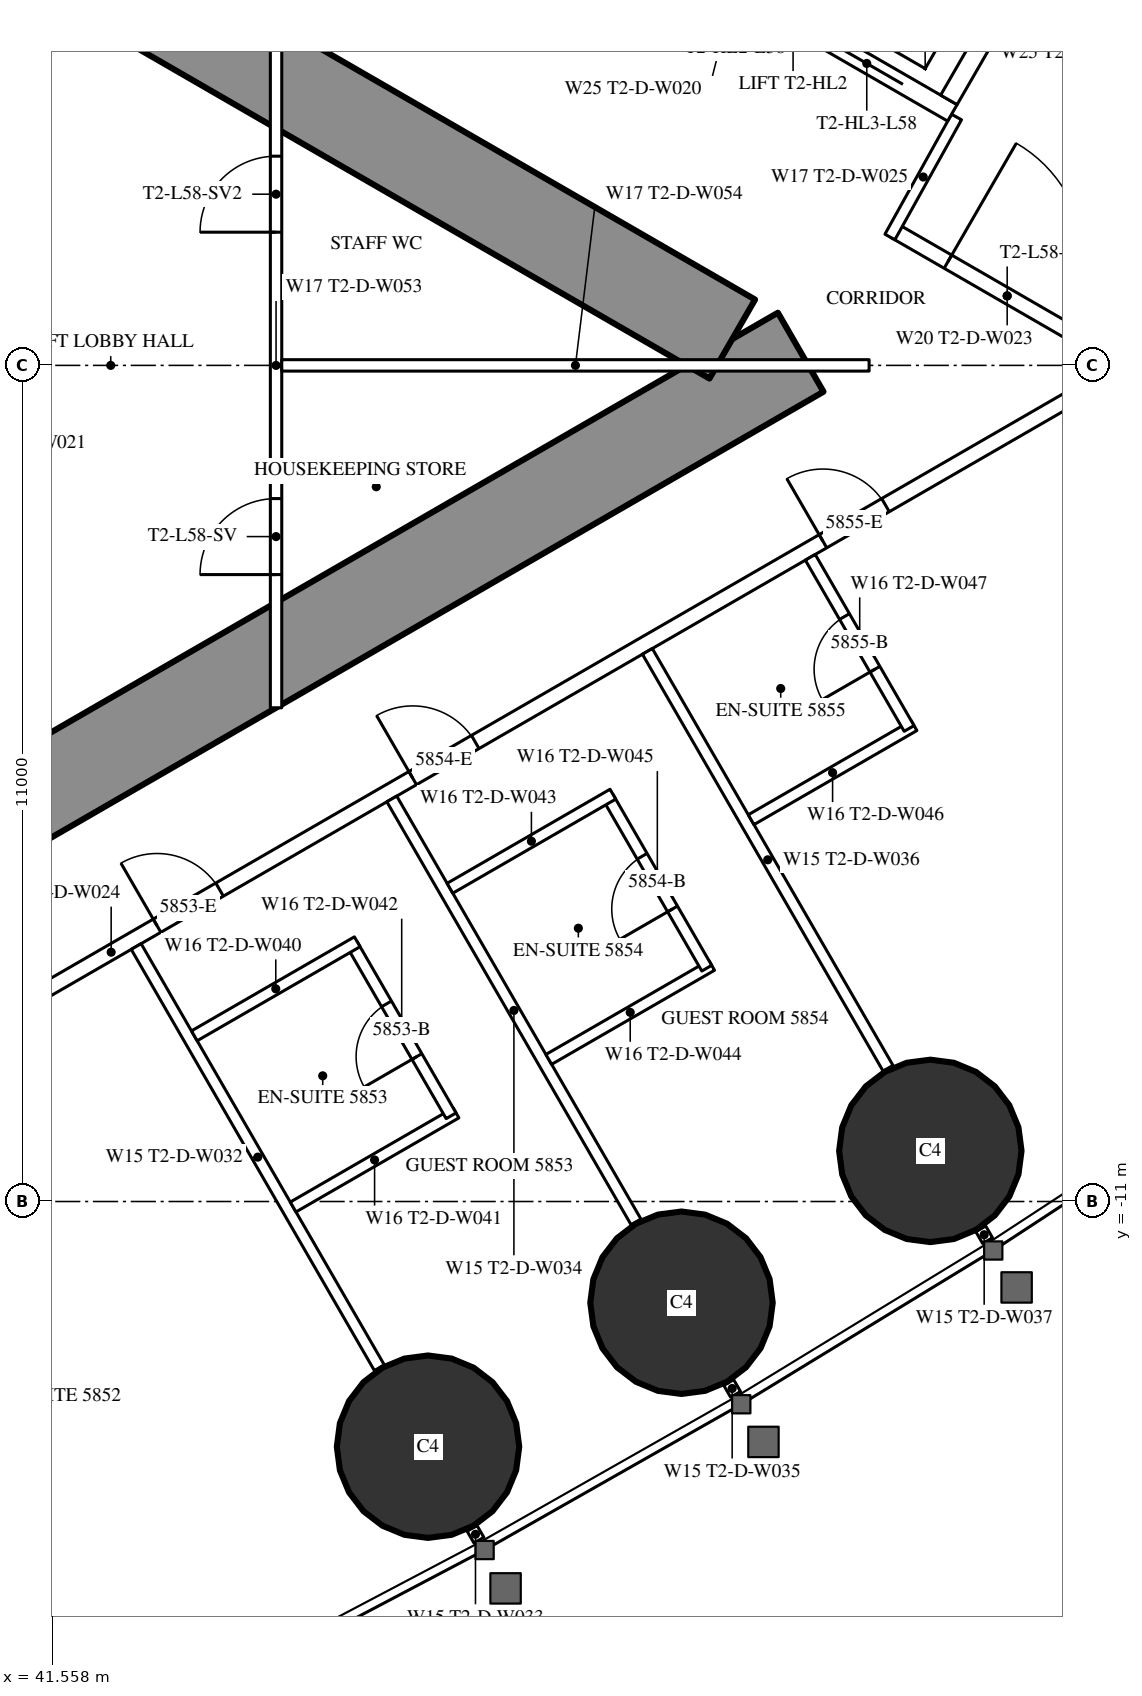
"""IFC4 building model, lengths in metres.
Left out: names, types, materials, properties, quantities, classifications, styles, units other than length and angle.
Written with IfcOpenShell. Run it as: python <this file> out.ifc"""

import sys

from ifc_helpers import new_model, si_unit, direction, frame, frame_2d, origin, origin_2d, place, context, subcontext, project, spatial, rectangle, circle, extrude, element, fill, save


model = new_model("IFC4")
c1 = context("Model", 3, precision=1e-05, world=origin(), true_north=direction((0.0, 1.0)))
c2 = subcontext(c1, "Body", "Model", "MODEL_VIEW")
j1 = project(units=[si_unit("LENGTHUNIT", "METRE"), si_unit("PLANEANGLEUNIT", "RADIAN")], contexts=[c1])
p1 = place(None, origin())
s1 = spatial("IfcSite", under=j1, at=p1, CompositionType="ELEMENT")
p2 = place(p1, origin())
s2 = spatial("IfcBuilding", under=s1, at=p2, CompositionType="ELEMENT")
p3 = place(p2, frame((0.0, 0.0, 218.9)))
s3 = spatial("IfcBuildingStorey", under=s2, at=p3, CompositionType="ELEMENT", Elevation=218.9)
for number, where, z_axis, x_axis in (
    (1, (46.499, -14.226, 0.0), (0.0, 0.0, 1.0), (1.0, 0.0, 0.0)),
    (2, (49.834, -12.332, 0.0), (0.0, 0.0, 1.0), (1.0, 0.0, 0.0)),
    (3, (53.108, -10.334, 0.0), (0.0, 0.0, 1.0), (1.0, 0.0, 0.0)),
):
    element("IfcColumn", number, at=place(p3, frame(where, z_axis=z_axis, x_axis=x_axis)), inside=s3, PredefinedType="COLUMN", context=c2, shape_type="SweptSolid", body=[
        extrude(circle(Radius=1.2, at=origin_2d()), origin(), (0.0, 0.0, 1.0), 3.6),
    ])
p4 = place(p3, frame((27.2, -13.8, 0.0), z_axis=(0.0, 0.0, 1.0), x_axis=(0.866027159892, 0.499996958321, 0.0)))
e4 = element("IfcWall", 4, at=p4, inside=s3, PredefinedType="SHEAR", context=c2, shape_type="SweptSolid", body=[
    extrude(rectangle(XDim=27.947, YDim=1.2, at=frame_2d((13.973, 0.0))), origin(), (0.0, 0.0, 1.0), 3.6),
])
p5 = place(p4, frame((4.6, 0.0, 0.0)))
e5 = element("IfcOpeningElement", 5, at=p5, cuts=e4, PredefinedType="OPENING", context=c2, shape_type="SweptSolid", body=[
    extrude(rectangle(XDim=1.0, YDim=2.2, at=frame_2d((0.5, 1.1))), frame((0.0, 0.61, 0.0), z_axis=(0.0, -1.0, 0.0), x_axis=(1.0, 0.0, 0.0)), (0.0, 0.0, 1.0), 1.22),
])
p6 = place(p4, frame((13.395, 0.0, 0.0)))
e6 = element("IfcOpeningElement", 6, at=p6, cuts=e4, PredefinedType="OPENING", context=c2, shape_type="SweptSolid", body=[
    extrude(rectangle(XDim=1.8, YDim=2.2, at=frame_2d((0.9, 1.1))), frame((0.0, 0.61, 0.0), z_axis=(0.0, -1.0, 0.0), x_axis=(1.0, 0.0, 0.0)), (0.0, 0.0, 1.0), 1.22),
])
p7 = place(p3, frame((27.2, 13.8, 0.0), z_axis=(0.0, 0.0, 1.0), x_axis=(0.866024515034, -0.500001539357, 0.0)))
e7 = element("IfcWall", 7, at=p7, inside=s3, PredefinedType="SHEAR", context=c2, shape_type="SweptSolid", body=[
    extrude(rectangle(XDim=26.907, YDim=1.2, at=frame_2d((13.454, 0.0))), origin(), (0.0, 0.0, 1.0), 3.6),
])
p8 = place(p7, frame((4.6, 0.0, 0.0)))
e8 = element("IfcOpeningElement", 8, at=p8, cuts=e7, PredefinedType="OPENING", context=c2, shape_type="SweptSolid", body=[
    extrude(rectangle(XDim=1.0, YDim=2.2, at=frame_2d((0.5, 1.1))), frame((0.0, 0.61, 0.0), z_axis=(0.0, -1.0, 0.0), x_axis=(1.0, 0.0, 0.0)), (0.0, 0.0, 1.0), 1.22),
])
p9 = place(p7, frame((13.395, 0.0, 0.0)))
e9 = element("IfcOpeningElement", 9, at=p9, cuts=e7, PredefinedType="OPENING", context=c2, shape_type="SweptSolid", body=[
    extrude(rectangle(XDim=1.8, YDim=2.2, at=frame_2d((0.9, 1.1))), frame((0.0, 0.61, 0.0), z_axis=(0.0, -1.0, 0.0), x_axis=(1.0, 0.0, 0.0)), (0.0, 0.0, 1.0), 1.22),
])
p10 = place(p3, frame((28.959, -15.44, 0.0), z_axis=(0.0, 0.0, 1.0), x_axis=(0.866025227435, 0.500000305447, 0.0)))
e10 = element("IfcWall", 10, at=p10, inside=s3, PredefinedType="PARTITIONING", context=c2, shape_type="SweptSolid", body=[
    extrude(rectangle(XDim=30.88, YDim=0.2, at=frame_2d((15.44, 0.0))), origin(), (0.0, 0.0, 1.0), 3.35),
])
p11 = place(p10, frame((1.494, 0.0, 0.0)))
e11 = element("IfcOpeningElement", 11, at=p11, cuts=e10, PredefinedType="OPENING", context=c2, shape_type="SweptSolid", body=[
    extrude(rectangle(XDim=1.8, YDim=2.03, at=frame_2d((0.9, 1.015))), frame((0.0, 0.11, 0.0), z_axis=(0.0, -1.0, 0.0), x_axis=(1.0, 0.0, 0.0)), (0.0, 0.0, 1.0), 0.22),
])
p12 = place(p10, frame((7.687, 0.0, 0.0)))
e12 = element("IfcOpeningElement", 12, at=p12, cuts=e10, PredefinedType="OPENING", context=c2, shape_type="SweptSolid", body=[
    extrude(rectangle(XDim=1.0, YDim=2.2, at=frame_2d((0.5, 1.1))), frame((0.0, 0.11, 0.0), z_axis=(0.0, -1.0, 0.0), x_axis=(1.0, 0.0, 0.0)), (0.0, 0.0, 1.0), 0.22),
])
p13 = place(p10, frame((16.137, 0.0, 0.0)))
e13 = element("IfcOpeningElement", 13, at=p13, cuts=e10, PredefinedType="OPENING", context=c2, shape_type="SweptSolid", body=[
    extrude(rectangle(XDim=0.95, YDim=2.2, at=frame_2d((0.475, 1.1))), frame((0.0, 0.11, 0.0), z_axis=(0.0, -1.0, 0.0), x_axis=(1.0, 0.0, 0.0)), (0.0, 0.0, 1.0), 0.22),
])
p14 = place(p10, frame((20.021, 0.0, 0.0)))
e14 = element("IfcOpeningElement", 14, at=p14, cuts=e10, PredefinedType="OPENING", context=c2, shape_type="SweptSolid", body=[
    extrude(rectangle(XDim=0.95, YDim=2.2, at=frame_2d((0.475, 1.1))), frame((0.0, 0.11, 0.0), z_axis=(0.0, -1.0, 0.0), x_axis=(1.0, 0.0, 0.0)), (0.0, 0.0, 1.0), 0.22),
])
p15 = place(p10, frame((26.253, 0.0, 0.0)))
e15 = element("IfcOpeningElement", 15, at=p15, cuts=e10, PredefinedType="OPENING", context=c2, shape_type="SweptSolid", body=[
    extrude(rectangle(XDim=0.95, YDim=2.2, at=frame_2d((0.475, 1.1))), frame((0.0, 0.11, 0.0), z_axis=(0.0, -1.0, 0.0), x_axis=(1.0, 0.0, 0.0)), (0.0, 0.0, 1.0), 0.22),
])
p16 = place(p3, frame((42.66, -7.646, 0.0), z_axis=(0.0, 0.0, 1.0), x_axis=(0.499996592859, -0.866027370889, 0.0)))
e16 = element("IfcWall", 16, at=p16, inside=s3, PredefinedType="PARTITIONING", context=c2, shape_type="SweptSolid", body=[
    extrude(rectangle(XDim=6.398, YDim=0.15, at=frame_2d((3.199, 0.0))), origin(), (0.0, 0.0, 1.0), 2.45),
])
p17 = place(p3, frame((47.079, -15.3, 0.0), z_axis=(0.0, 0.0, 1.0), x_axis=(0.499212083968, -0.866479829667, 0.0)))
e17 = element("IfcWall", 17, at=p17, inside=s3, PredefinedType="PARTITIONING", context=c2, shape_type="SweptSolid", body=[
    extrude(rectangle(XDim=0.179, YDim=0.15, at=frame_2d((0.09, 0.0))), origin(), (0.0, 0.0, 1.0), 2.45),
])
p18 = place(p3, frame((46.023, -5.704, 0.0), z_axis=(0.0, 0.0, 1.0), x_axis=(0.499984478165, -0.866034365135, 0.0)))
e18 = element("IfcWall", 18, at=p18, inside=s3, PredefinedType="PARTITIONING", context=c2, shape_type="SweptSolid", body=[
    extrude(rectangle(XDim=6.426, YDim=0.15, at=frame_2d((3.213, 0.0))), origin(), (0.0, 0.0, 1.0), 2.45),
])
p19 = place(p3, frame((50.456, -13.382, 0.0), z_axis=(0.0, 0.0, 1.0), x_axis=(0.500661834965, -0.865642955848, 0.0)))
e19 = element("IfcWall", 19, at=p19, inside=s3, PredefinedType="PARTITIONING", context=c2, shape_type="SweptSolid", body=[
    extrude(rectangle(XDim=0.18, YDim=0.15, at=frame_2d((0.09, 0.0))), origin(), (0.0, 0.0, 1.0), 2.45),
])
p20 = place(p3, frame((49.385, -3.763, 0.0), z_axis=(0.0, 0.0, 1.0), x_axis=(0.499999447814, -0.866025722589, 0.0)))
e20 = element("IfcWall", 20, at=p20, inside=s3, PredefinedType="PARTITIONING", context=c2, shape_type="SweptSolid", body=[
    extrude(rectangle(XDim=6.333, YDim=0.15, at=frame_2d((3.166, 0.0))), origin(), (0.0, 0.0, 1.0), 2.45),
])
p21 = place(p3, frame((53.771, -11.36, 0.0), z_axis=(0.0, 0.0, 1.0), x_axis=(0.499524978789, -0.866299483762, 0.0)))
e21 = element("IfcWall", 21, at=p21, inside=s3, PredefinedType="PARTITIONING", context=c2, shape_type="SweptSolid", body=[
    extrude(rectangle(XDim=0.178, YDim=0.15, at=frame_2d((0.089, 0.0))), origin(), (0.0, 0.0, 1.0), 2.45),
])
p22 = place(p3, frame((52.639, 1.769, 0.0), z_axis=(0.0, 0.0, 1.0), x_axis=(0.866027340901, -0.4999966448, 0.0)))
e22 = element("IfcWall", 22, at=p22, inside=s3, PredefinedType="PARTITIONING", context=c2, shape_type="SweptSolid", body=[
    extrude(rectangle(XDim=3.417, YDim=0.2, at=frame_2d((1.708, 0.0))), origin(), (0.0, 0.0, 1.0), 3.35),
])
p23 = place(p22, frame((0.809, 0.0, 0.0)))
e23 = element("IfcOpeningElement", 23, at=p23, cuts=e22, PredefinedType="OPENING", context=c2, shape_type="SweptSolid", body=[
    extrude(rectangle(XDim=1.8, YDim=2.2, at=frame_2d((0.9, 1.1))), frame((0.0, 0.11, 0.0), z_axis=(0.0, -1.0, 0.0), x_axis=(1.0, 0.0, 0.0)), (0.0, 0.0, 1.0), 0.22),
])
p24 = place(p3, frame((52.576, 1.689, 0.0), z_axis=(0.0, 0.0, 1.0), x_axis=(0.485424724123, 0.874278466629, 0.0)))
e24 = element("IfcWall", 24, at=p24, inside=s3, PredefinedType="PARTITIONING", context=c2, shape_type="SweptSolid", body=[
    extrude(rectangle(XDim=1.805, YDim=0.15, at=frame_2d((0.903, 0.0))), origin(), (0.0, 0.0, 1.0), 3.35),
])
p25 = place(p3, frame((44.725, -11.072, 0.0), z_axis=(0.0, 0.0, 1.0), x_axis=(0.866006523861, 0.500032699561, 0.0)))
e25 = element("IfcWall", 25, at=p25, inside=s3, PredefinedType="PARTITIONING", context=c2, shape_type="SweptSolid", body=[
    extrude(rectangle(XDim=2.475, YDim=0.15, at=frame_2d((1.237, 0.0))), origin(), (0.0, 0.0, 1.0), 3.35),
])
p26 = place(p3, frame((45.503, -7.621, 0.0), z_axis=(0.0, 0.0, 1.0), x_axis=(0.500006934395, -0.866021400173, 0.0)))
e26 = element("IfcWall", 26, at=p26, inside=s3, PredefinedType="PARTITIONING", context=c2, shape_type="SweptSolid", body=[
    extrude(rectangle(XDim=2.6, YDim=0.15, at=frame_2d((1.3, 0.0))), origin(), (0.0, 0.0, 1.0), 3.35),
])
p27 = place(p26, frame((0.9, 0.0, 0.0)))
e27 = element("IfcOpeningElement", 27, at=p27, cuts=e26, PredefinedType="OPENING", context=c2, shape_type="SweptSolid", body=[
    extrude(rectangle(XDim=0.8, YDim=2.2, at=frame_2d((0.4, 1.1))), frame((0.0, 0.085, 0.0), z_axis=(0.0, -1.0, 0.0), x_axis=(1.0, 0.0, 0.0)), (0.0, 0.0, 1.0), 0.17),
])
for number, where, z_axis, x_axis in (
    (28, (43.425, -8.821, 0.0), (0.0, 0.0, 1.0), (0.866, 0.5, 0.0)),
    (29, (48.088, -9.13, 0.0), (0.0, 0.0, 1.0), (0.866, 0.5, 0.0)),
):
    element("IfcWall", number, at=place(p3, frame(where, z_axis=z_axis, x_axis=x_axis)), inside=s3, PredefinedType="PARTITIONING", context=c2, shape_type="SweptSolid", body=[
        extrude(rectangle(XDim=2.475, YDim=0.15, at=frame_2d((1.237, 0.0))), origin(), (0.0, 0.0, 1.0), 3.35),
    ])
p28 = place(p3, frame((48.866, -5.679, 0.0), z_axis=(0.0, 0.0, 1.0), x_axis=(0.500006934395, -0.866021400173, 0.0)))
e30 = element("IfcWall", 30, at=p28, inside=s3, PredefinedType="PARTITIONING", context=c2, shape_type="SweptSolid", body=[
    extrude(rectangle(XDim=2.6, YDim=0.15, at=frame_2d((1.3, 0.0))), origin(), (0.0, 0.0, 1.0), 3.35),
])
p29 = place(p28, frame((0.9, 0.0, 0.0)))
e31 = element("IfcOpeningElement", 31, at=p29, cuts=e30, PredefinedType="OPENING", context=c2, shape_type="SweptSolid", body=[
    extrude(rectangle(XDim=0.8, YDim=2.2, at=frame_2d((0.4, 1.1))), frame((0.0, 0.085, 0.0), z_axis=(0.0, -1.0, 0.0), x_axis=(1.0, 0.0, 0.0)), (0.0, 0.0, 1.0), 0.17),
])
p30 = place(p3, frame((46.788, -6.879, 0.0), z_axis=(0.0, 0.0, 1.0), x_axis=(0.866006523861, 0.500032699561, 0.0)))
e32 = element("IfcWall", 32, at=p30, inside=s3, PredefinedType="PARTITIONING", context=c2, shape_type="SweptSolid", body=[
    extrude(rectangle(XDim=2.475, YDim=0.15, at=frame_2d((1.237, 0.0))), origin(), (0.0, 0.0, 1.0), 3.35),
])
p31 = place(p3, frame((50.75, -5.977, 0.0), z_axis=(0.0, 0.0, 1.0), x_axis=(0.866031185235, 0.4999899861, 0.0)))
e33 = element("IfcWall", 33, at=p31, inside=s3, PredefinedType="PARTITIONING", context=c2, shape_type="SweptSolid", body=[
    extrude(rectangle(XDim=2.475, YDim=0.15, at=frame_2d((1.238, 0.0))), origin(), (0.0, 0.0, 1.0), 3.35),
])
p32 = place(p3, frame((51.529, -2.525, 0.0), z_axis=(0.0, 0.0, 1.0), x_axis=(0.500006934395, -0.866021400173, 0.0)))
e34 = element("IfcWall", 34, at=p32, inside=s3, PredefinedType="PARTITIONING", context=c2, shape_type="SweptSolid", body=[
    extrude(rectangle(XDim=2.6, YDim=0.15, at=frame_2d((1.3, 0.0))), origin(), (0.0, 0.0, 1.0), 3.35),
])
p33 = place(p32, frame((0.9, 0.0, 0.0)))
e35 = element("IfcOpeningElement", 35, at=p33, cuts=e34, PredefinedType="OPENING", context=c2, shape_type="SweptSolid", body=[
    extrude(rectangle(XDim=0.8, YDim=2.2, at=frame_2d((0.4, 1.1))), frame((0.0, 0.085, 0.0), z_axis=(0.0, -1.0, 0.0), x_axis=(1.0, 0.0, 0.0)), (0.0, 0.0, 1.0), 0.17),
])
p34 = place(p3, frame((44.5, -4.505, 0.0), z_axis=(0.0, 0.0, 1.0), x_axis=(0.0, 1.0, 0.0)))
e36 = element("IfcWall", 36, at=p34, inside=s3, PredefinedType="PARTITIONING", context=c2, shape_type="SweptSolid", body=[
    extrude(rectangle(XDim=9.009, YDim=0.15, at=frame_2d((4.505, 0.0))), origin(), (0.0, 0.0, 1.0), 3.35),
])
p35 = place(p34, frame((1.752, 0.0, 0.0)))
e37 = element("IfcOpeningElement", 37, at=p35, cuts=e36, PredefinedType="OPENING", context=c2, shape_type="SweptSolid", body=[
    extrude(rectangle(XDim=1.0, YDim=2.2, at=frame_2d((0.5, 1.1))), frame((0.0, 0.085, 0.0), z_axis=(0.0, -1.0, 0.0), x_axis=(1.0, 0.0, 0.0)), (0.0, 0.0, 1.0), 0.17),
])
p36 = place(p34, frame((6.257, 0.0, 0.0)))
e38 = element("IfcOpeningElement", 38, at=p36, cuts=e36, PredefinedType="OPENING", context=c2, shape_type="SweptSolid", body=[
    extrude(rectangle(XDim=1.0, YDim=2.2, at=frame_2d((0.5, 1.1))), frame((0.0, 0.085, 0.0), z_axis=(0.0, -1.0, 0.0), x_axis=(1.0, 0.0, 0.0)), (0.0, 0.0, 1.0), 0.17),
])
p37 = place(p3, frame((44.575, 0.0, 0.0), z_axis=(0.0, 0.0, 1.0), x_axis=(1.0, 0.0, 0.0)))
e39 = element("IfcWall", 39, at=p37, inside=s3, PredefinedType="PARTITIONING", context=c2, shape_type="SweptSolid", body=[
    extrude(rectangle(XDim=7.727, YDim=0.15, at=frame_2d((3.864, 0.0))), origin(), (0.0, 0.0, 1.0), 2.45),
])
p38 = place(p3, frame((47.681, 6.622, 0.0), z_axis=(0.0, 0.0, 1.0), x_axis=(0.86603344179, -0.499986077507, 0.0)))
e40 = element("IfcWall", 40, at=p38, inside=s3, PredefinedType="PARTITIONING", context=c2, shape_type="SweptSolid", body=[
    extrude(rectangle(XDim=6.6, YDim=0.25, at=frame_2d((3.3, 0.0))), origin(), (0.0, 0.0, 1.0), 3.35),
])
p39 = place(p38, frame((0.75, 0.0, 0.0)))
e41 = element("IfcOpeningElement", 41, at=p39, cuts=e40, PredefinedType="OPENING", context=c2, shape_type="SweptSolid", body=[
    extrude(rectangle(XDim=1.1, YDim=2.2, at=frame_2d((0.55, 1.1))), frame((0.0, 0.135, 0.0), z_axis=(0.0, -1.0, 0.0), x_axis=(1.0, 0.0, 0.0)), (0.0, 0.0, 1.0), 0.27),
])
p40 = place(p38, frame((2.75, 0.0, 0.0)))
e42 = element("IfcOpeningElement", 42, at=p40, cuts=e40, PredefinedType="OPENING", context=c2, shape_type="SweptSolid", body=[
    extrude(rectangle(XDim=1.1, YDim=2.2, at=frame_2d((0.55, 1.1))), frame((0.0, 0.135, 0.0), z_axis=(0.0, -1.0, 0.0), x_axis=(1.0, 0.0, 0.0)), (0.0, 0.0, 1.0), 0.27),
])
p41 = place(p38, frame((4.75, 0.0, 0.0)))
e43 = element("IfcOpeningElement", 43, at=p41, cuts=e40, PredefinedType="OPENING", context=c2, shape_type="SweptSolid", body=[
    extrude(rectangle(XDim=1.1, YDim=2.2, at=frame_2d((0.55, 1.1))), frame((0.0, 0.135, 0.0), z_axis=(0.0, -1.0, 0.0), x_axis=(1.0, 0.0, 0.0)), (0.0, 0.0, 1.0), 0.27),
])
p42 = place(p3, frame((53.352, 3.493, 0.0), z_axis=(0.0, 0.0, 1.0), x_axis=(0.499872130319, 0.866099216793, 0.0)))
e44 = element("IfcWall", 44, at=p42, inside=s3, PredefinedType="PARTITIONING", context=c2, shape_type="SweptSolid", body=[
    extrude(rectangle(XDim=3.2, YDim=0.25, at=frame_2d((1.6, 0.0))), origin(), (0.0, 0.0, 1.0), 3.35),
])
p43 = place(p27, origin())
e45 = element("IfcDoor", 45, at=p43, inside=s3, OperationType="SINGLE_SWING_RIGHT", PredefinedType="DOOR", context=c2, shape_type="SweptSolid", body=[
    extrude(rectangle(XDim=0.8, YDim=2.2, at=frame_2d((0.4, 1.1))), frame((0.0, 0.025, 0.0), z_axis=(0.0, -1.0, 0.0), x_axis=(1.0, 0.0, 0.0)), (0.0, 0.0, 1.0), 0.05),
])
fill(e27, e45)
p44 = place(p13, origin())
e46 = element("IfcDoor", 46, at=p44, inside=s3, OperationType="SINGLE_SWING_LEFT", PredefinedType="DOOR", context=c2, shape_type="SweptSolid", body=[
    extrude(rectangle(XDim=0.95, YDim=2.2, at=frame_2d((0.475, 1.1))), frame((0.0, 0.025, 0.0), z_axis=(0.0, -1.0, 0.0), x_axis=(1.0, 0.0, 0.0)), (0.0, 0.0, 1.0), 0.05),
])
fill(e13, e46)
p45 = place(p29, origin())
e47 = element("IfcDoor", 47, at=p45, inside=s3, OperationType="SINGLE_SWING_RIGHT", PredefinedType="DOOR", context=c2, shape_type="SweptSolid", body=[
    extrude(rectangle(XDim=0.8, YDim=2.2, at=frame_2d((0.4, 1.1))), frame((0.0, 0.025, 0.0), z_axis=(0.0, -1.0, 0.0), x_axis=(1.0, 0.0, 0.0)), (0.0, 0.0, 1.0), 0.05),
])
fill(e31, e47)
p46 = place(p14, origin())
e48 = element("IfcDoor", 48, at=p46, inside=s3, OperationType="SINGLE_SWING_LEFT", PredefinedType="DOOR", context=c2, shape_type="SweptSolid", body=[
    extrude(rectangle(XDim=0.95, YDim=2.2, at=frame_2d((0.475, 1.1))), frame((0.0, 0.025, 0.0), z_axis=(0.0, -1.0, 0.0), x_axis=(1.0, 0.0, 0.0)), (0.0, 0.0, 1.0), 0.05),
])
fill(e14, e48)
p47 = place(p33, origin())
e49 = element("IfcDoor", 49, at=p47, inside=s3, OperationType="SINGLE_SWING_RIGHT", PredefinedType="DOOR", context=c2, shape_type="SweptSolid", body=[
    extrude(rectangle(XDim=0.8, YDim=2.2, at=frame_2d((0.4, 1.1))), frame((0.0, 0.025, 0.0), z_axis=(0.0, -1.0, 0.0), x_axis=(1.0, 0.0, 0.0)), (0.0, 0.0, 1.0), 0.05),
])
fill(e35, e49)
p48 = place(p15, origin())
e50 = element("IfcDoor", 50, at=p48, inside=s3, OperationType="SINGLE_SWING_LEFT", PredefinedType="DOOR", context=c2, shape_type="SweptSolid", body=[
    extrude(rectangle(XDim=0.95, YDim=2.2, at=frame_2d((0.475, 1.1))), frame((0.0, 0.025, 0.0), z_axis=(0.0, -1.0, 0.0), x_axis=(1.0, 0.0, 0.0)), (0.0, 0.0, 1.0), 0.05),
])
fill(e15, e50)
p49 = place(p23, origin())
e51 = element("IfcDoor", 51, at=p49, inside=s3, OperationType="DOUBLE_DOOR_SINGLE_SWING", PredefinedType="DOOR", context=c2, shape_type="SweptSolid", body=[
    extrude(rectangle(XDim=1.8, YDim=2.2, at=frame_2d((0.9, 1.1))), frame((0.0, 0.025, 0.0), z_axis=(0.0, -1.0, 0.0), x_axis=(1.0, 0.0, 0.0)), (0.0, 0.0, 1.0), 0.05),
])
fill(e23, e51)
p50 = place(p35, origin())
e52 = element("IfcDoor", 52, at=p50, inside=s3, OperationType="SINGLE_SWING_LEFT", PredefinedType="DOOR", context=c2, shape_type="SweptSolid", body=[
    extrude(rectangle(XDim=1.0, YDim=2.2, at=frame_2d((0.5, 1.1))), frame((0.0, 0.025, 0.0), z_axis=(0.0, -1.0, 0.0), x_axis=(1.0, 0.0, 0.0)), (0.0, 0.0, 1.0), 0.05),
])
fill(e37, e52)
p51 = place(p36, origin())
e53 = element("IfcDoor", 53, at=p51, inside=s3, OperationType="SINGLE_SWING_LEFT", PredefinedType="DOOR", context=c2, shape_type="SweptSolid", body=[
    extrude(rectangle(XDim=1.0, YDim=2.2, at=frame_2d((0.5, 1.1))), frame((0.0, 0.025, 0.0), z_axis=(0.0, -1.0, 0.0), x_axis=(1.0, 0.0, 0.0)), (0.0, 0.0, 1.0), 0.05),
])
fill(e38, e53)
p52 = place(p41, origin())
e54 = element("IfcDoor", 54, at=p52, inside=s3, OperationType="DOUBLE_DOOR_SLIDING", PredefinedType="USERDEFINED", context=c2, shape_type="SweptSolid", body=[
    extrude(rectangle(XDim=1.1, YDim=2.2, at=frame_2d((0.55, 1.1))), frame((0.0, 0.025, 0.0), z_axis=(0.0, -1.0, 0.0), x_axis=(1.0, 0.0, 0.0)), (0.0, 0.0, 1.0), 0.05),
])
fill(e43, e54)
save(model, sys.argv[1])
